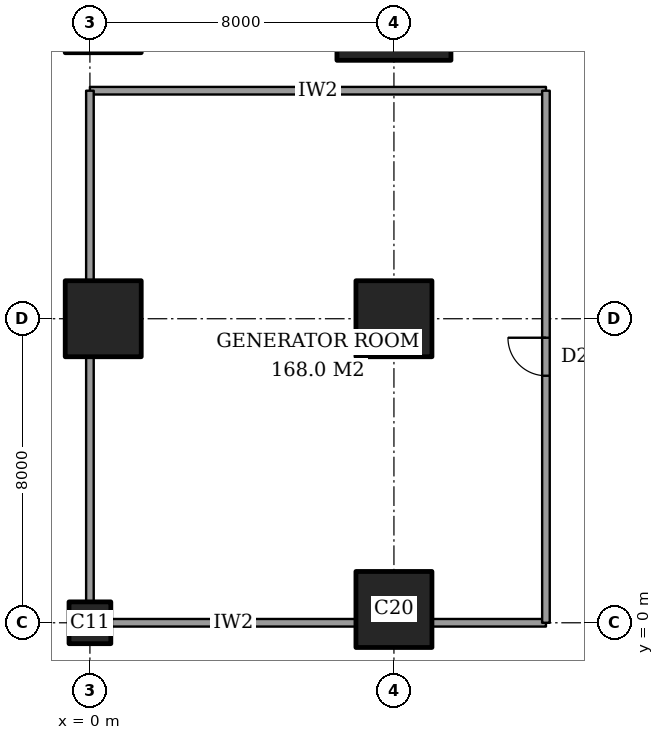
"""IFC4 building model, lengths in metres.
Left out: names, types, materials, properties, quantities, classifications, styles, units other than length and angle.
Written with IfcOpenShell. Run it as: python <this file> out.ifc"""

import sys

from ifc_helpers import new_model, si_unit, direction, frame, frame_2d, origin, origin_with_axes, origin_2d, place, context, subcontext, project, spatial, rectangle, extrude, element, fill, save


model = new_model("IFC4")
c1 = context("Model", 3, precision=1e-05, world=origin(), true_north=direction((0.0, 1.0)))
c2 = subcontext(c1, "Body", "Model", "MODEL_VIEW")
j1 = project(units=[si_unit("LENGTHUNIT", "METRE"), si_unit("PLANEANGLEUNIT", "RADIAN")], contexts=[c1])
p1 = place(None, origin())
s1 = spatial("IfcSite", under=j1, at=p1, CompositionType="ELEMENT")
p2 = place(p1, origin())
s2 = spatial("IfcBuilding", under=s1, at=p2, CompositionType="ELEMENT")
p3 = place(p2, frame((0.0, 0.0, -5.0)))
s3 = spatial("IfcBuildingStorey", under=s2, at=p3, CompositionType="ELEMENT", Elevation=-5.0)
p4 = place(p3, origin_with_axes())
e1 = element("IfcColumn", 1, at=p4, inside=s3, PredefinedType="COLUMN", context=c2, shape_type="SweptSolid", body=[
    extrude(rectangle(XDim=1.1, YDim=1.1, at=origin_2d()), origin(), (0.0, 0.0, 1.0), 5.0),
])
for number, where, z_axis, x_axis in (
    (2, (0.35, 8.0, 0.0), (0.0, 0.0, 1.0), (1.0, 0.0, 0.0)),
    (3, (8.0, 0.35, 0.0), (0.0, 0.0, 1.0), (1.0, 0.0, 0.0)),
    (4, (8.0, 8.0, 0.0), (0.0, 0.0, 1.0), (1.0, 0.0, 0.0)),
):
    element("IfcColumn", number, at=place(p3, frame(where, z_axis=z_axis, x_axis=x_axis)), inside=s3, PredefinedType="COLUMN", context=c2, shape_type="SweptSolid", body=[
        extrude(rectangle(XDim=2.0, YDim=2.0, at=origin_2d()), origin(), (0.0, 0.0, 1.0), 5.0),
    ])
p5 = place(p3, frame((8.0, 16.0, 0.0), z_axis=(0.0, 0.0, 1.0), x_axis=(1.0, 0.0, 0.0)))
e5 = element("IfcColumn", 5, at=p5, inside=s3, PredefinedType="COLUMN", context=c2, shape_type="SweptSolid", body=[
    extrude(rectangle(XDim=3.0, YDim=2.4, at=origin_2d()), origin(), (0.0, 0.0, 1.0), 5.0),
])
p6 = place(p3, frame((0.55, 0.0, 0.0), z_axis=(0.0, 0.0, 1.0), x_axis=(1.0, 0.0, 0.0)))
e6 = element("IfcWall", 6, at=p6, inside=s3, PredefinedType="PARTITIONING", context=c2, shape_type="SweptSolid", body=[
    extrude(rectangle(XDim=6.45, YDim=0.2, at=frame_2d((3.225, 0.0))), origin(), (0.0, 0.0, 1.0), 3.3),
])
p7 = place(p3, frame((9.0, 0.0, 0.0), z_axis=(0.0, 0.0, 1.0), x_axis=(1.0, 0.0, 0.0)))
e7 = element("IfcWall", 7, at=p7, inside=s3, PredefinedType="PARTITIONING", context=c2, shape_type="SweptSolid", body=[
    extrude(rectangle(XDim=3.0, YDim=0.2, at=frame_2d((1.5, 0.0))), origin(), (0.0, 0.0, 1.0), 3.3),
])
p8 = place(p3, frame((0.0, 14.0, 0.0), z_axis=(0.0, 0.0, 1.0), x_axis=(1.0, 0.0, 0.0)))
e8 = element("IfcWall", 8, at=p8, inside=s3, PredefinedType="PARTITIONING", context=c2, shape_type="SweptSolid", body=[
    extrude(rectangle(XDim=12.0, YDim=0.2, at=frame_2d((6.0, 0.0))), origin(), (0.0, 0.0, 1.0), 4.7),
])
p9 = place(p3, frame((0.0, 0.55, 0.0), z_axis=(0.0, 0.0, 1.0), x_axis=(0.0, 1.0, 0.0)))
e9 = element("IfcWall", 9, at=p9, inside=s3, PredefinedType="PARTITIONING", context=c2, shape_type="SweptSolid", body=[
    extrude(rectangle(XDim=6.45, YDim=0.2, at=frame_2d((3.225, 0.0))), origin(), (0.0, 0.0, 1.0), 3.3),
])
p10 = place(p3, frame((0.0, 9.0, 0.0), z_axis=(0.0, 0.0, 1.0), x_axis=(0.0, 1.0, 0.0)))
e10 = element("IfcWall", 10, at=p10, inside=s3, PredefinedType="PARTITIONING", context=c2, shape_type="SweptSolid", body=[
    extrude(rectangle(XDim=5.0, YDim=0.2, at=frame_2d((2.5, 0.0))), origin(), (0.0, 0.0, 1.0), 3.3),
])
p11 = place(p3, frame((12.0, 0.0, 0.0), z_axis=(0.0, 0.0, 1.0), x_axis=(0.0, 1.0, 0.0)))
e11 = element("IfcWall", 11, at=p11, inside=s3, PredefinedType="PARTITIONING", context=c2, shape_type="SweptSolid", body=[
    extrude(rectangle(XDim=14.0, YDim=0.2, at=frame_2d((7.0, 0.0))), origin(), (0.0, 0.0, 1.0), 4.7),
])
p12 = place(p11, frame((6.5, 0.0, 0.0)))
e12 = element("IfcOpeningElement", 12, at=p12, cuts=e11, PredefinedType="OPENING", context=c2, shape_type="SweptSolid", body=[
    extrude(rectangle(XDim=1.0, YDim=2.1, at=frame_2d((0.5, 1.05))), frame((0.0, 0.11, 0.0), z_axis=(0.0, -1.0, 0.0), x_axis=(1.0, 0.0, 0.0)), (0.0, 0.0, 1.0), 0.22),
])
p13 = place(p12, origin())
e13 = element("IfcDoor", 13, at=p13, inside=s3, OperationType="SINGLE_SWING_LEFT", PredefinedType="DOOR", context=c2, shape_type="SweptSolid", body=[
    extrude(rectangle(XDim=1.0, YDim=2.1, at=frame_2d((0.5, 1.05))), frame((0.0, 0.025, 0.0), z_axis=(0.0, -1.0, 0.0), x_axis=(1.0, 0.0, 0.0)), (0.0, 0.0, 1.0), 0.05),
])
fill(e12, e13)
save(model, sys.argv[1])
